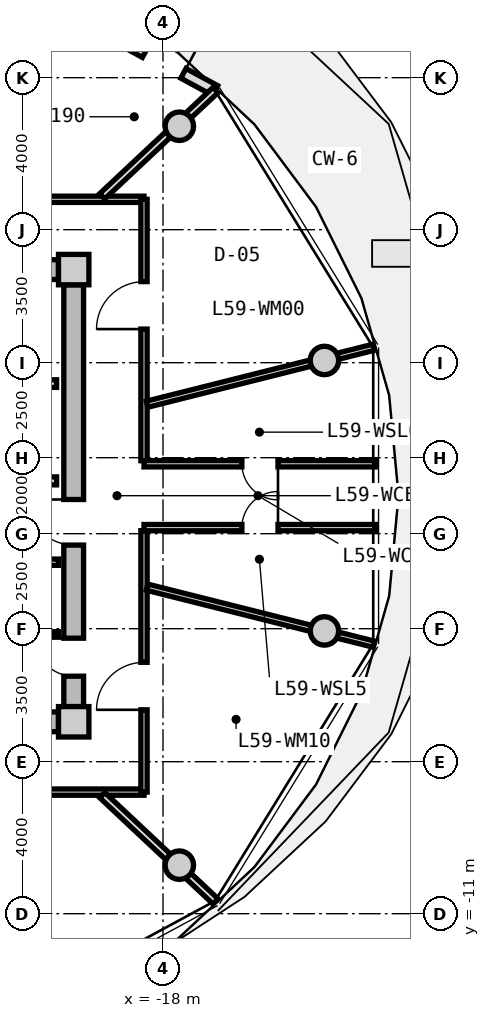
"""IFC4 building model, lengths in metres.
Left out: names, types, materials, properties, quantities, classifications, styles, units other than length and angle.
Written with IfcOpenShell. Run it as: python <this file> out.ifc"""

import sys

from ifc_helpers import new_model, si_unit, direction, frame, frame_2d, origin, origin_2d, place, context, subcontext, project, spatial, rectangle, circle, extrude, source, transform, mapped, element, fill, save


model = new_model("IFC4")
c1 = context("Model", 3, precision=1e-05, world=origin(), true_north=direction((0.0, 1.0)))
c2 = subcontext(c1, "Body", "Model", "MODEL_VIEW")
j1 = project(units=[si_unit("LENGTHUNIT", "METRE"), si_unit("PLANEANGLEUNIT", "RADIAN")], contexts=[c1])
p1 = place(None, origin())
s1 = spatial("IfcSite", under=j1, at=p1, CompositionType="ELEMENT")
p2 = place(p1, origin())
s2 = spatial("IfcBuilding", under=s1, at=p2, CompositionType="ELEMENT")
p3 = place(p2, frame((0.0, 0.0, 190.65)))
s3 = spatial("IfcBuildingStorey", under=s2, at=p3, CompositionType="ELEMENT", Elevation=190.65)
m1 = source(origin(), c2, "Body", "SweptSolid", [
    extrude(rectangle(XDim=0.8, YDim=0.8, at=origin_2d()), origin(), (0.0, 0.0, 1.0), 3.05),
])
for number, where, z_axis, x_axis in (
    (1, (-20.35, -5.95, 0.0), (0.0, 0.0, 1.0), (1.0, 0.0, 0.0)),
    (2, (-20.35, 5.95, 0.0), (0.0, 0.0, 1.0), (1.0, 0.0, 0.0)),
):
    element("IfcColumn", number, at=place(p3, frame(where, z_axis=z_axis, x_axis=x_axis)), inside=s3, PredefinedType="COLUMN", context=c2, shape_type="MappedRepresentation", body=[
        mapped(m1, transform((0.0, 0.0, 0.0), x_axis=(1.0, 0.0, 0.0), y_axis=(0.0, 1.0, 0.0), z_axis=(0.0, 0.0, 1.0), scale=1.0)),
    ])
m2 = source(origin(), c2, "Body", "SweptSolid", [
    extrude(rectangle(XDim=14.5, YDim=0.52, at=frame_2d((7.25, 0.0))), origin(), (0.0, 0.0, 1.0), 2.81),
])
for number, where, z_axis, x_axis in (
    (3, (-35.25, 5.95, 0.0), (0.0, 0.0, 1.0), (1.0, 0.0, 0.0)),
    (4, (-20.75, -5.95, 0.0), (0.0, 0.0, 1.0), (-1.0, 0.0, 0.0)),
):
    element("IfcWall", number, at=place(p3, frame(where, z_axis=z_axis, x_axis=x_axis)), inside=s3, PredefinedType="SHEAR", context=c2, shape_type="MappedRepresentation", body=[
        mapped(m2, transform((0.0, 0.0, 0.0), x_axis=(1.0, 0.0, 0.0), y_axis=(0.0, 1.0, 0.0), z_axis=(0.0, 0.0, 1.0), scale=1.0)),
    ])
m3 = source(origin(), c2, "Body", "SweptSolid", [
    extrude(rectangle(XDim=11.1, YDim=0.52, at=frame_2d((5.55, 0.0))), origin(), (0.0, 0.0, 1.0), 2.81),
])
p4 = place(p3, frame((-20.35, 5.55, 0.0), z_axis=(0.0, 0.0, 1.0), x_axis=(0.0, -1.0, 0.0)))
e5 = element("IfcWall", 5, at=p4, inside=s3, PredefinedType="SHEAR", context=c2, shape_type="MappedRepresentation", body=[
    mapped(m3, transform((0.0, 0.0, 0.0), x_axis=(1.0, 0.0, 0.0), y_axis=(0.0, 1.0, 0.0), z_axis=(0.0, 0.0, 1.0), scale=1.0)),
])
p5 = place(p4, frame((5.65, 0.0, 0.0)))
e6 = element("IfcOpeningElement", 6, at=p5, cuts=e5, PredefinedType="OPENING", context=c2, shape_type="SweptSolid", body=[
    extrude(rectangle(XDim=1.2, YDim=2.15, at=frame_2d((0.6, 1.075))), frame((0.0, 0.27, 0.0), z_axis=(0.0, -1.0, 0.0), x_axis=(1.0, 0.0, 0.0)), (0.0, 0.0, 1.0), 0.54),
])
p6 = place(p4, frame((9.3, 0.0, 0.0)))
e7 = element("IfcOpeningElement", 7, at=p6, cuts=e5, PredefinedType="OPENING", context=c2, shape_type="SweptSolid", body=[
    extrude(rectangle(XDim=1.0, YDim=2.1, at=frame_2d((0.5, 1.05))), frame((0.0, 0.27, 0.0), z_axis=(0.0, -1.0, 0.0), x_axis=(1.0, 0.0, 0.0)), (0.0, 0.0, 1.0), 0.54),
])
m4 = source(origin(), c2, "Body", "SweptSolid", [
    extrude(circle(Radius=0.375, at=origin_2d()), origin(), (0.0, 0.0, 1.0), 3.47),
])
for number, where, z_axis, x_axis in (
    (8, (-13.753, 3.559, -0.42), (0.0, 0.0, 1.0), (1.0, 0.0, 0.0)),
    (9, (-17.57, 9.723, -0.42), (0.0, 0.0, 1.0), (1.0, 0.0, 0.0)),
    (10, (-17.57, -9.723, -0.42), (0.0, 0.0, 1.0), (1.0, 0.0, 0.0)),
    (11, (-13.753, -3.559, -0.42), (0.0, 0.0, 1.0), (1.0, 0.0, 0.0)),
):
    element("IfcColumn", number, at=place(p3, frame(where, z_axis=z_axis, x_axis=x_axis)), inside=s3, PredefinedType="COLUMN", context=c2, shape_type="MappedRepresentation", body=[
        mapped(m4, transform((0.0, 0.0, 0.0), x_axis=(1.0, 0.0, 0.0), y_axis=(0.0, 1.0, 0.0), z_axis=(0.0, 0.0, 1.0), scale=1.0)),
    ])
m5 = source(origin(), c2, "Body", "SweptSolid", [
    extrude(rectangle(XDim=8.197, YDim=0.29, at=frame_2d((4.099, 0.0))), origin(), (0.0, 0.0, 1.0), 2.81),
])
p7 = place(p3, frame((-23.838, 14.566, 0.0), z_axis=(0.0, 0.0, 1.0), x_axis=(0.879369910001, -0.476139224791, 0.0)))
e12 = element("IfcWall", 12, at=p7, inside=s3, PredefinedType="SOLIDWALL", context=c2, shape_type="MappedRepresentation", body=[
    mapped(m5, transform((0.0, 0.0, 0.0), x_axis=(1.0, 0.0, 0.0), y_axis=(0.0, 1.0, 0.0), z_axis=(0.0, 0.0, 1.0), scale=1.0)),
])
p8 = place(p7, frame((6.1, 0.0, 0.0)))
e13 = element("IfcOpeningElement", 13, at=p8, cuts=e12, PredefinedType="OPENING", context=c2, shape_type="SweptSolid", body=[
    extrude(rectangle(XDim=1.15, YDim=2.25, at=frame_2d((0.575, 1.125))), frame((0.0, 0.155, 0.0), z_axis=(0.0, -1.0, 0.0), x_axis=(1.0, 0.0, 0.0)), (0.0, 0.0, 1.0), 0.31),
])
p9 = place(p7, frame((0.85, 0.0, 0.85)))
e14 = element("IfcOpeningElement", 14, at=p9, cuts=e12, PredefinedType="OPENING", context=c2, shape_type="SweptSolid", body=[
    extrude(rectangle(XDim=1.2, YDim=1.5, at=frame_2d((0.6, 0.75))), frame((0.0, 0.155, 0.0), z_axis=(0.0, -1.0, 0.0), x_axis=(1.0, 0.0, 0.0)), (0.0, 0.0, 1.0), 0.31),
])
m6 = source(origin(), c2, "Body", "SweptSolid", [
    extrude(rectangle(XDim=3.2, YDim=0.2, at=frame_2d((1.6, 0.0))), origin(), (0.0, 0.0, 1.0), 2.795),
])
p10 = place(p3, frame((-24.0, 2.95, 0.0), z_axis=(0.0, 0.0, 1.0), x_axis=(1.0, 0.0, 0.0)))
e15 = element("IfcWall", 15, at=p10, inside=s3, PredefinedType="PARTITIONING", context=c2, shape_type="MappedRepresentation", body=[
    mapped(m6, transform((0.0, 0.0, 0.0), x_axis=(1.0, 0.0, 0.0), y_axis=(0.0, 1.0, 0.0), z_axis=(0.0, 0.0, 1.0), scale=1.0)),
])
m7 = source(origin(), c2, "Body", "SweptSolid", [
    extrude(rectangle(XDim=6.66, YDim=0.21, at=frame_2d((3.33, 0.0))), origin(), (0.0, 0.0, 1.0), 2.795),
])
p11 = place(p3, frame((-27.46, 0.39, 0.0), z_axis=(0.0, 0.0, 1.0), x_axis=(1.0, 0.0, 0.0)))
e16 = element("IfcWall", 16, at=p11, inside=s3, PredefinedType="PARTITIONING", context=c2, shape_type="MappedRepresentation", body=[
    mapped(m7, transform((0.0, 0.0, 0.0), x_axis=(1.0, 0.0, 0.0), y_axis=(0.0, 1.0, 0.0), z_axis=(0.0, 0.0, 1.0), scale=1.0)),
])
p12 = place(p11, frame((1.0, 0.0, 0.0)))
e17 = element("IfcOpeningElement", 17, at=p12, cuts=e16, PredefinedType="OPENING", context=c2, shape_type="SweptSolid", body=[
    extrude(rectangle(XDim=1.2, YDim=2.15, at=frame_2d((0.6, 1.075))), frame((0.0, 0.115, 0.0), z_axis=(0.0, -1.0, 0.0), x_axis=(1.0, 0.0, 0.0)), (0.0, 0.0, 1.0), 0.23),
])
m8 = source(origin(), c2, "Body", "SweptSolid", [
    extrude(rectangle(XDim=2.7, YDim=0.165, at=frame_2d((1.35, 0.0))), origin(), (0.0, 0.0, 1.0), 2.795),
])
p13 = place(p3, frame((-23.45, -1.75, 0.0), z_axis=(0.0, 0.0, 1.0), x_axis=(1.0, 0.0, 0.0)))
e18 = element("IfcWall", 18, at=p13, inside=s3, PredefinedType="PARTITIONING", context=c2, shape_type="MappedRepresentation", body=[
    mapped(m8, transform((0.0, 0.0, 0.0), x_axis=(1.0, 0.0, 0.0), y_axis=(0.0, 1.0, 0.0), z_axis=(0.0, 0.0, 1.0), scale=1.0)),
])
p14 = place(p13, frame((0.85, 0.0, 0.0)))
e19 = element("IfcOpeningElement", 19, at=p14, cuts=e18, PredefinedType="OPENING", context=c2, shape_type="SweptSolid", body=[
    extrude(rectangle(XDim=0.925, YDim=2.1, at=frame_2d((0.462, 1.05))), frame((0.0, 0.093, 0.0), z_axis=(0.0, -1.0, 0.0), x_axis=(1.0, 0.0, 0.0)), (0.0, 0.0, 1.0), 0.185),
])
m9 = source(origin(), c2, "Body", "SweptSolid", [
    extrude(rectangle(XDim=2.7, YDim=0.14, at=frame_2d((1.35, 0.0))), origin(), (0.0, 0.0, 1.0), 2.795),
])
p15 = place(p3, frame((-23.45, -3.65, 0.0), z_axis=(0.0, 0.0, 1.0), x_axis=(1.0, 0.0, 0.0)))
e20 = element("IfcWall", 20, at=p15, inside=s3, PredefinedType="PARTITIONING", context=c2, shape_type="MappedRepresentation", body=[
    mapped(m9, transform((0.0, 0.0, 0.0), x_axis=(1.0, 0.0, 0.0), y_axis=(0.0, 1.0, 0.0), z_axis=(0.0, 0.0, 1.0), scale=1.0)),
])
m10 = source(origin(), c2, "Body", "SweptSolid", [
    extrude(rectangle(XDim=8.58, YDim=0.165, at=frame_2d((4.29, 0.0))), origin(), (0.0, 0.0, 1.0), 2.795),
])
p16 = place(p3, frame((-27.08, 7.8, 0.0), z_axis=(0.0, 0.0, 1.0), x_axis=(1.0, 0.0, 0.0)))
e21 = element("IfcWall", 21, at=p16, inside=s3, PredefinedType="PARTITIONING", context=c2, shape_type="MappedRepresentation", body=[
    mapped(m10, transform((0.0, 0.0, 0.0), x_axis=(1.0, 0.0, 0.0), y_axis=(0.0, 1.0, 0.0), z_axis=(0.0, 0.0, 1.0), scale=1.0)),
])
p17 = place(p16, frame((3.802, 0.0, 0.0)))
e22 = element("IfcOpeningElement", 22, at=p17, cuts=e21, PredefinedType="OPENING", context=c2, shape_type="SweptSolid", body=[
    extrude(rectangle(XDim=1.25, YDim=2.2, at=frame_2d((0.625, 1.1))), frame((0.0, 0.093, 0.0), z_axis=(0.0, -1.0, 0.0), x_axis=(1.0, 0.0, 0.0)), (0.0, 0.0, 1.0), 0.185),
])
m11 = source(origin(), c2, "Body", "SweptSolid", [
    extrude(rectangle(XDim=19.0, YDim=0.165, at=frame_2d((9.5, 0.0))), origin(), (0.0, 0.0, 1.0), 2.795),
])
p18 = place(p3, frame((-18.5, -7.8, 0.0), z_axis=(0.0, 0.0, 1.0), x_axis=(-1.0, 0.0, 0.0)))
e23 = element("IfcWall", 23, at=p18, inside=s3, PredefinedType="PARTITIONING", context=c2, shape_type="MappedRepresentation", body=[
    mapped(m11, transform((0.0, 0.0, 0.0), x_axis=(1.0, 0.0, 0.0), y_axis=(0.0, 1.0, 0.0), z_axis=(0.0, 0.0, 1.0), scale=1.0)),
])
p19 = place(p18, frame((12.569, 0.0, 0.0)))
e24 = element("IfcOpeningElement", 24, at=p19, cuts=e23, PredefinedType="OPENING", context=c2, shape_type="SweptSolid", body=[
    extrude(rectangle(XDim=1.25, YDim=2.2, at=frame_2d((0.625, 1.1))), frame((0.0, 0.093, 0.0), z_axis=(0.0, -1.0, 0.0), x_axis=(1.0, 0.0, 0.0)), (0.0, 0.0, 1.0), 0.185),
])
p20 = place(p18, frame((7.868, 0.0, 0.0)))
e25 = element("IfcOpeningElement", 25, at=p20, cuts=e23, PredefinedType="OPENING", context=c2, shape_type="SweptSolid", body=[
    extrude(rectangle(XDim=1.25, YDim=2.2, at=frame_2d((0.625, 1.1))), frame((0.0, 0.093, 0.0), z_axis=(0.0, -1.0, 0.0), x_axis=(1.0, 0.0, 0.0)), (0.0, 0.0, 1.0), 0.185),
])
p21 = place(p18, frame((3.559, 0.0, 0.0)))
e26 = element("IfcOpeningElement", 26, at=p21, cuts=e23, PredefinedType="OPENING", context=c2, shape_type="SweptSolid", body=[
    extrude(rectangle(XDim=1.25, YDim=2.2, at=frame_2d((0.625, 1.1))), frame((0.0, 0.093, 0.0), z_axis=(0.0, -1.0, 0.0), x_axis=(1.0, 0.0, 0.0)), (0.0, 0.0, 1.0), 0.185),
])
m12 = source(origin(), c2, "Body", "SweptSolid", [
    extrude(rectangle(XDim=6.88, YDim=0.165, at=frame_2d((3.44, 0.0))), origin(), (0.0, 0.0, 1.0), 2.795),
])
p22 = place(p3, frame((-18.5, 7.8, 0.0), z_axis=(0.0, 0.0, 1.0), x_axis=(0.0, -1.0, 0.0)))
e27 = element("IfcWall", 27, at=p22, inside=s3, PredefinedType="PARTITIONING", context=c2, shape_type="MappedRepresentation", body=[
    mapped(m12, transform((0.0, 0.0, 0.0), x_axis=(1.0, 0.0, 0.0), y_axis=(0.0, 1.0, 0.0), z_axis=(0.0, 0.0, 1.0), scale=1.0)),
])
p23 = place(p22, frame((2.166, 0.0, 0.0)))
e28 = element("IfcOpeningElement", 28, at=p23, cuts=e27, PredefinedType="OPENING", context=c2, shape_type="SweptSolid", body=[
    extrude(rectangle(XDim=1.25, YDim=2.2, at=frame_2d((0.625, 1.1))), frame((0.0, 0.093, 0.0), z_axis=(0.0, -1.0, 0.0), x_axis=(1.0, 0.0, 0.0)), (0.0, 0.0, 1.0), 0.185),
])
p24 = place(p3, frame((-18.5, -0.92, 0.0), z_axis=(0.0, 0.0, 1.0), x_axis=(0.0, -1.0, 0.0)))
e29 = element("IfcWall", 29, at=p24, inside=s3, PredefinedType="PARTITIONING", context=c2, shape_type="MappedRepresentation", body=[
    mapped(m12, transform((0.0, 0.0, 0.0), x_axis=(1.0, 0.0, 0.0), y_axis=(0.0, 1.0, 0.0), z_axis=(0.0, 0.0, 1.0), scale=1.0)),
])
p25 = place(p24, frame((3.464, 0.0, 0.0)))
e30 = element("IfcOpeningElement", 30, at=p25, cuts=e29, PredefinedType="OPENING", context=c2, shape_type="SweptSolid", body=[
    extrude(rectangle(XDim=1.25, YDim=2.2, at=frame_2d((0.625, 1.1))), frame((0.0, 0.093, 0.0), z_axis=(0.0, -1.0, 0.0), x_axis=(1.0, 0.0, 0.0)), (0.0, 0.0, 1.0), 0.185),
])
m13 = source(origin(), c2, "Body", "SweptSolid", [
    extrude(rectangle(XDim=6.157, YDim=0.165, at=frame_2d((3.079, 0.0))), origin(), (0.0, 0.0, 1.0), 2.395),
])
for number, where, z_axis, x_axis in (
    (31, (-18.42, -2.407, 0.0), (0.0, 0.0, 1.0), (0.97, -0.244, 0.0)),
    (32, (-18.42, 2.407, 0.0), (0.0, 0.0, 1.0), (0.97, 0.244, 0.0)),
):
    element("IfcWall", number, at=place(p3, frame(where, z_axis=z_axis, x_axis=x_axis)), inside=s3, PredefinedType="PARTITIONING", context=c2, shape_type="MappedRepresentation", body=[
        mapped(m13, transform((0.0, 0.0, 0.0), x_axis=(1.0, 0.0, 0.0), y_axis=(0.0, 1.0, 0.0), z_axis=(0.0, 0.0, 1.0), scale=1.0)),
    ])
m14 = source(origin(), c2, "Body", "SweptSolid", [
    extrude(rectangle(XDim=6.101, YDim=0.165, at=frame_2d((3.051, 0.0))), origin(), (0.0, 0.0, 1.0), 2.795),
])
p26 = place(p3, frame((-18.5, 0.84, 0.0), z_axis=(0.0, 0.0, 1.0), x_axis=(1.0, 0.0, 0.0)))
e33 = element("IfcWall", 33, at=p26, inside=s3, PredefinedType="PARTITIONING", context=c2, shape_type="MappedRepresentation", body=[
    mapped(m14, transform((0.0, 0.0, 0.0), x_axis=(1.0, 0.0, 0.0), y_axis=(0.0, 1.0, 0.0), z_axis=(0.0, 0.0, 1.0), scale=1.0)),
])
p27 = place(p26, frame((2.576, 0.0, 0.0)))
e34 = element("IfcOpeningElement", 34, at=p27, cuts=e33, PredefinedType="OPENING", context=c2, shape_type="SweptSolid", body=[
    extrude(rectangle(XDim=0.95, YDim=2.1, at=frame_2d((0.475, 1.05))), frame((0.0, 0.093, 0.0), z_axis=(0.0, -1.0, 0.0), x_axis=(1.0, 0.0, 0.0)), (0.0, 0.0, 1.0), 0.185),
])
p28 = place(p3, frame((-12.399, -0.84, 0.0), z_axis=(0.0, 0.0, 1.0), x_axis=(-1.0, 0.0, 0.0)))
e35 = element("IfcWall", 35, at=p28, inside=s3, PredefinedType="PARTITIONING", context=c2, shape_type="MappedRepresentation", body=[
    mapped(m14, transform((0.0, 0.0, 0.0), x_axis=(1.0, 0.0, 0.0), y_axis=(0.0, 1.0, 0.0), z_axis=(0.0, 0.0, 1.0), scale=1.0)),
])
p29 = place(p28, frame((2.576, 0.0, 0.0)))
e36 = element("IfcOpeningElement", 36, at=p29, cuts=e35, PredefinedType="OPENING", context=c2, shape_type="SweptSolid", body=[
    extrude(rectangle(XDim=0.95, YDim=2.1, at=frame_2d((0.475, 1.05))), frame((0.0, 0.093, 0.0), z_axis=(0.0, -1.0, 0.0), x_axis=(1.0, 0.0, 0.0)), (0.0, 0.0, 1.0), 0.185),
])
m15 = source(origin(), c2, "Body", "SweptSolid", [
    extrude(rectangle(XDim=4.089, YDim=0.19, at=frame_2d((2.044, 0.0))), origin(), (0.0, 0.0, 1.0), 2.395),
])
for number, where, z_axis, x_axis in (
    (37, (-19.598, 7.88, 0.0), (0.0, 0.0, 1.0), (0.729, 0.684, 0.0)),
    (38, (-19.598, -7.88, 0.0), (0.0, 0.0, 1.0), (0.729, -0.684, 0.0)),
):
    element("IfcWall", number, at=place(p3, frame(where, z_axis=z_axis, x_axis=x_axis)), inside=s3, PredefinedType="PARTITIONING", context=c2, shape_type="MappedRepresentation", body=[
        mapped(m15, transform((0.0, 0.0, 0.0), x_axis=(1.0, 0.0, 0.0), y_axis=(0.0, 1.0, 0.0), z_axis=(0.0, 0.0, 1.0), scale=1.0)),
    ])
m16 = source(origin(), c2, "Body", "SweptSolid", [
    extrude(rectangle(XDim=1.15, YDim=2.25, at=frame_2d((0.575, 1.125))), frame((0.0, 0.025, 0.0), z_axis=(0.0, -1.0, 0.0), x_axis=(1.0, 0.0, 0.0)), (0.0, 0.0, 1.0), 0.05),
])
p30 = place(p8, origin())
e39 = element("IfcDoor", 39, at=p30, inside=s3, OperationType="SINGLE_SWING_RIGHT", PredefinedType="DOOR", context=c2, shape_type="MappedRepresentation", body=[
    mapped(m16, transform((0.0, 0.0, 0.0), x_axis=(1.0, 0.0, 0.0), y_axis=(0.0, 1.0, 0.0), z_axis=(0.0, 0.0, 1.0), scale=1.0)),
])
fill(e13, e39)
m17 = source(origin(), c2, "Body", "SweptSolid", [
    extrude(rectangle(XDim=1.2, YDim=2.15, at=frame_2d((0.6, 1.075))), frame((0.0, 0.025, 0.0), z_axis=(0.0, -1.0, 0.0), x_axis=(1.0, 0.0, 0.0)), (0.0, 0.0, 1.0), 0.05),
])
p31 = place(p5, frame((1.2, 0.0, 0.0), z_axis=(0.0, 0.0, 1.0), x_axis=(-1.0, 0.0, 0.0)))
e40 = element("IfcDoor", 40, at=p31, inside=s3, OperationType="SINGLE_SWING_RIGHT", PredefinedType="DOOR", context=c2, shape_type="MappedRepresentation", body=[
    mapped(m17, transform((0.0, 0.0, 0.0), x_axis=(1.0, 0.0, 0.0), y_axis=(0.0, 1.0, 0.0), z_axis=(0.0, 0.0, 1.0), scale=1.0)),
])
fill(e6, e40)
m18 = source(origin(), c2, "Body", "SweptSolid", [
    extrude(rectangle(XDim=1.0, YDim=2.1, at=frame_2d((0.5, 1.05))), frame((0.0, 0.025, 0.0), z_axis=(0.0, -1.0, 0.0), x_axis=(1.0, 0.0, 0.0)), (0.0, 0.0, 1.0), 0.05),
])
p32 = place(p6, frame((1.0, 0.0, 0.0), z_axis=(0.0, 0.0, 1.0), x_axis=(-1.0, 0.0, 0.0)))
e41 = element("IfcDoor", 41, at=p32, inside=s3, OperationType="SINGLE_SWING_RIGHT", PredefinedType="DOOR", context=c2, shape_type="MappedRepresentation", body=[
    mapped(m18, transform((0.0, 0.0, 0.0), x_axis=(1.0, 0.0, 0.0), y_axis=(0.0, 1.0, 0.0), z_axis=(0.0, 0.0, 1.0), scale=1.0)),
])
fill(e7, e41)
m19 = source(origin(), c2, "Body", "SweptSolid", [
    extrude(rectangle(XDim=0.95, YDim=2.1, at=frame_2d((0.475, 1.05))), frame((0.0, 0.025, 0.0), z_axis=(0.0, -1.0, 0.0), x_axis=(1.0, 0.0, 0.0)), (0.0, 0.0, 1.0), 0.05),
])
p33 = place(p29, frame((0.95, 0.0, 0.0), z_axis=(0.0, 0.0, 1.0), x_axis=(-1.0, 0.0, 0.0)))
e42 = element("IfcDoor", 42, at=p33, inside=s3, OperationType="SINGLE_SWING_RIGHT", PredefinedType="DOOR", context=c2, shape_type="MappedRepresentation", body=[
    mapped(m19, transform((0.0, 0.0, 0.0), x_axis=(1.0, 0.0, 0.0), y_axis=(0.0, 1.0, 0.0), z_axis=(0.0, 0.0, 1.0), scale=1.0)),
])
fill(e36, e42)
p34 = place(p27, frame((0.95, 0.0, 0.0), z_axis=(0.0, 0.0, 1.0), x_axis=(-1.0, 0.0, 0.0)))
e43 = element("IfcDoor", 43, at=p34, inside=s3, OperationType="SINGLE_SWING_LEFT", PredefinedType="DOOR", context=c2, shape_type="MappedRepresentation", body=[
    mapped(m19, transform((0.0, 0.0, 0.0), x_axis=(1.0, 0.0, 0.0), y_axis=(0.0, 1.0, 0.0), z_axis=(0.0, 0.0, 1.0), scale=1.0)),
])
fill(e34, e43)
m20 = source(origin(), c2, "Body", "SweptSolid", [
    extrude(rectangle(XDim=1.25, YDim=2.2, at=frame_2d((0.625, 1.1))), frame((0.0, 0.025, 0.0), z_axis=(0.0, -1.0, 0.0), x_axis=(1.0, 0.0, 0.0)), (0.0, 0.0, 1.0), 0.05),
])
p35 = place(p23, frame((1.25, 0.0, 0.0), z_axis=(0.0, 0.0, 1.0), x_axis=(-1.0, 0.0, 0.0)))
e44 = element("IfcDoor", 44, at=p35, inside=s3, OperationType="SINGLE_SWING_LEFT", PredefinedType="DOOR", context=c2, shape_type="MappedRepresentation", body=[
    mapped(m20, transform((0.0, 0.0, 0.0), x_axis=(1.0, 0.0, 0.0), y_axis=(0.0, 1.0, 0.0), z_axis=(0.0, 0.0, 1.0), scale=1.0)),
])
fill(e28, e44)
p36 = place(p25, frame((1.25, 0.0, 0.0), z_axis=(0.0, 0.0, 1.0), x_axis=(-1.0, 0.0, 0.0)))
e45 = element("IfcDoor", 45, at=p36, inside=s3, OperationType="SINGLE_SWING_LEFT", PredefinedType="DOOR", context=c2, shape_type="MappedRepresentation", body=[
    mapped(m20, transform((0.0, 0.0, 0.0), x_axis=(1.0, 0.0, 0.0), y_axis=(0.0, 1.0, 0.0), z_axis=(0.0, 0.0, 1.0), scale=1.0)),
])
fill(e30, e45)
save(model, sys.argv[1])
